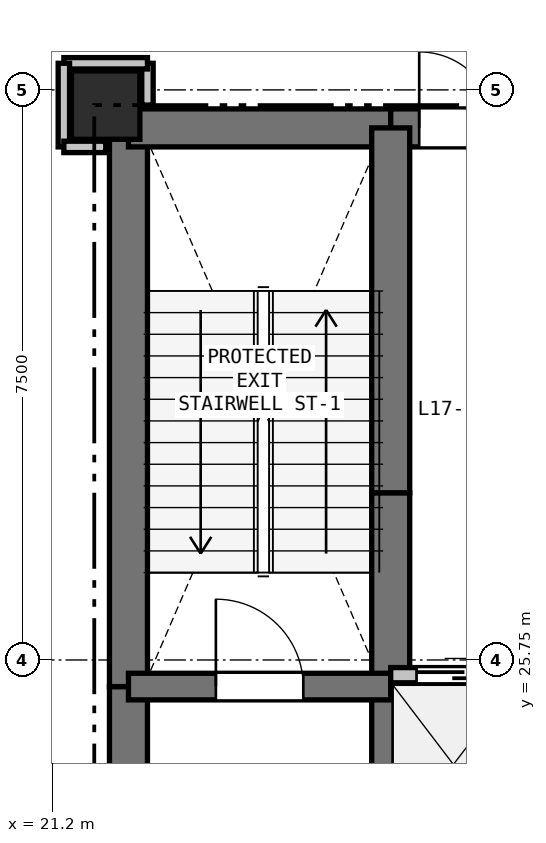
"""IFC4 building model, lengths in metres.
Left out: names, types, materials, properties, quantities, classifications, styles, units other than length and angle.
Written with IfcOpenShell. Run it as: python <this file> out.ifc"""

import sys

from ifc_helpers import new_model, si_unit, direction, frame, frame_2d, origin, origin_2d, place, context, subcontext, project, spatial, rectangle, extrude, element, fill, save


model = new_model("IFC4")
c1 = context("Model", 3, precision=1e-05, world=origin(), true_north=direction((0.0, 1.0)))
c2 = subcontext(c1, "Body", "Model", "MODEL_VIEW")
j1 = project(units=[si_unit("LENGTHUNIT", "METRE"), si_unit("PLANEANGLEUNIT", "RADIAN")], contexts=[c1])
p1 = place(None, origin())
s1 = spatial("IfcSite", under=j1, at=p1, CompositionType="ELEMENT")
p2 = place(p1, origin())
s2 = spatial("IfcBuilding", under=s1, at=p2, CompositionType="ELEMENT")
p3 = place(p2, frame((0.0, 0.0, 62.1)))
s3 = spatial("IfcBuildingStorey", under=s2, at=p3, CompositionType="ELEMENT", Elevation=62.1)
p4 = place(p3, frame((21.9, 33.05, 0.0), z_axis=(0.0, 0.0, 1.0), x_axis=(1.0, 0.0, 0.0)))
e1 = element("IfcColumn", 1, at=p4, inside=s3, PredefinedType="COLUMN", context=c2, shape_type="SweptSolid", body=[
    extrude(rectangle(XDim=0.9, YDim=0.9, at=origin_2d()), origin(), (0.0, 0.0, 1.0), 4.8),
])
p5 = place(p3, frame((22.2, 20.75, 0.0), z_axis=(0.0, 0.0, 1.0), x_axis=(0.0, 1.0, 0.0)))
e2 = element("IfcWall", 2, at=p5, inside=s3, PredefinedType="SHEAR", context=c2, shape_type="SweptSolid", body=[
    extrude(rectangle(XDim=4.65, YDim=0.5, at=frame_2d((2.325, 0.0))), origin(), (0.0, 0.0, 1.0), 4.48),
])
p6 = place(p3, frame((22.2, 25.4, 0.0), z_axis=(0.0, 0.0, 1.0), x_axis=(0.0, 1.0, 0.0)))
e3 = element("IfcWall", 3, at=p6, inside=s3, PredefinedType="SHEAR", context=c2, shape_type="SweptSolid", body=[
    extrude(rectangle(XDim=7.35, YDim=0.5, at=frame_2d((3.675, 0.0))), origin(), (0.0, 0.0, 1.0), 4.48),
])
p7 = place(p3, frame((22.2, 32.75, 0.0), z_axis=(0.0, 0.0, 1.0), x_axis=(1.0, 0.0, 0.0)))
e4 = element("IfcWall", 4, at=p7, inside=s3, PredefinedType="SHEAR", context=c2, shape_type="SweptSolid", body=[
    extrude(rectangle(XDim=3.45, YDim=0.5, at=frame_2d((1.725, 0.0))), origin(), (0.0, 0.0, 1.0), 4.48),
])
p8 = place(p3, frame((25.65, 32.75, 0.0), z_axis=(0.0, 0.0, 1.0), x_axis=(1.0, 0.0, 0.0)))
e5 = element("IfcWall", 5, at=p8, inside=s3, PredefinedType="SHEAR", context=c2, shape_type="SweptSolid", body=[
    extrude(rectangle(XDim=1.75, YDim=0.5, at=frame_2d((0.875, 0.0))), origin(), (0.0, 0.0, 1.0), 4.48),
])
p9 = place(p8, frame((0.375, 0.0, 0.0)))
e6 = element("IfcOpeningElement", 6, at=p9, cuts=e5, PredefinedType="OPENING", context=c2, shape_type="SweptSolid", body=[
    extrude(rectangle(XDim=1.0, YDim=2.15, at=frame_2d((0.5, 1.075))), frame((0.0, 0.26, 0.0), z_axis=(0.0, -1.0, 0.0), x_axis=(1.0, 0.0, 0.0)), (0.0, 0.0, 1.0), 0.52),
])
p10 = place(p3, frame((25.65, 22.75, 0.0), z_axis=(0.0, 0.0, 1.0), x_axis=(0.0, 1.0, 0.0)))
e7 = element("IfcWall", 7, at=p10, inside=s3, PredefinedType="SHEAR", context=c2, shape_type="SweptSolid", body=[
    extrude(rectangle(XDim=2.8, YDim=0.5, at=frame_2d((1.4, 0.0))), origin(), (0.0, 0.0, 1.0), 4.48),
])
p11 = place(p3, frame((25.65, 25.55, 0.0), z_axis=(0.0, 0.0, 1.0), x_axis=(0.0, 1.0, 0.0)))
e8 = element("IfcWall", 8, at=p11, inside=s3, PredefinedType="SHEAR", context=c2, shape_type="SweptSolid", body=[
    extrude(rectangle(XDim=2.4, YDim=0.5, at=frame_2d((1.2, 0.0))), origin(), (0.0, 0.0, 1.0), 4.48),
])
p12 = place(p3, frame((25.65, 27.95, 0.0), z_axis=(0.0, 0.0, 1.0), x_axis=(0.0, 1.0, 0.0)))
e9 = element("IfcWall", 9, at=p12, inside=s3, PredefinedType="SHEAR", context=c2, shape_type="SweptSolid", body=[
    extrude(rectangle(XDim=4.8, YDim=0.5, at=frame_2d((2.4, 0.0))), origin(), (0.0, 0.0, 1.0), 4.48),
])
p13 = place(p3, frame((22.2, 25.4, 0.0), z_axis=(0.0, 0.0, 1.0), x_axis=(1.0, 0.0, 0.0)))
e10 = element("IfcWall", 10, at=p13, inside=s3, PredefinedType="SHEAR", context=c2, shape_type="SweptSolid", body=[
    extrude(rectangle(XDim=3.45, YDim=0.35, at=frame_2d((1.725, 0.0))), origin(), (0.0, 0.0, 1.0), 4.48),
])
p14 = place(p13, frame((1.15, 0.0, 0.0)))
e11 = element("IfcOpeningElement", 11, at=p14, cuts=e10, PredefinedType="OPENING", context=c2, shape_type="SweptSolid", body=[
    extrude(rectangle(XDim=1.15, YDim=2.15, at=frame_2d((0.575, 1.075))), frame((0.0, 0.185, 0.0), z_axis=(0.0, -1.0, 0.0), x_axis=(1.0, 0.0, 0.0)), (0.0, 0.0, 1.0), 0.37),
])
p15 = place(p3, frame((25.65, 25.55, 0.0), z_axis=(0.0, 0.0, 1.0), x_axis=(1.0, 0.0, 0.0)))
e12 = element("IfcWall", 12, at=p15, inside=s3, PredefinedType="PARTITIONING", context=c2, shape_type="SweptSolid", body=[
    extrude(rectangle(XDim=4.95, YDim=0.2, at=frame_2d((2.475, 0.0))), origin(), (0.0, 0.0, 1.0), 4.48),
])
p16 = place(p15, frame((0.34, 0.0, 0.0)))
e13 = element("IfcOpeningElement", 13, at=p16, cuts=e12, PredefinedType="OPENING", context=c2, shape_type="SweptSolid", body=[
    extrude(rectangle(XDim=1.1, YDim=2.15, at=frame_2d((0.55, 1.075))), frame((0.0, 0.11, 0.0), z_axis=(0.0, -1.0, 0.0), x_axis=(1.0, 0.0, 0.0)), (0.0, 0.0, 1.0), 0.22),
])
p17 = place(p15, frame((1.99, 0.0, 0.0)))
e14 = element("IfcOpeningElement", 14, at=p17, cuts=e12, PredefinedType="OPENING", context=c2, shape_type="SweptSolid", body=[
    extrude(rectangle(XDim=1.1, YDim=2.15, at=frame_2d((0.55, 1.075))), frame((0.0, 0.11, 0.0), z_axis=(0.0, -1.0, 0.0), x_axis=(1.0, 0.0, 0.0)), (0.0, 0.0, 1.0), 0.22),
])
p18 = place(p15, frame((3.64, 0.0, 0.0)))
e15 = element("IfcOpeningElement", 15, at=p18, cuts=e12, PredefinedType="OPENING", context=c2, shape_type="SweptSolid", body=[
    extrude(rectangle(XDim=1.1, YDim=2.15, at=frame_2d((0.55, 1.075))), frame((0.0, 0.11, 0.0), z_axis=(0.0, -1.0, 0.0), x_axis=(1.0, 0.0, 0.0)), (0.0, 0.0, 1.0), 0.22),
])
p19 = place(p3, frame((22.45, 33.05, 0.0), z_axis=(0.0, 0.0, 1.0), x_axis=(0.0, 1.0, 0.0)))
e16 = element("IfcWall", 16, at=p19, inside=s3, PredefinedType="PARTITIONING", context=c2, shape_type="SweptSolid", body=[
    extrude(rectangle(XDim=0.55, YDim=0.15, at=frame_2d((0.275, 0.0))), origin(), (0.0, 0.0, 1.0), 3.928),
])
p20 = place(p3, frame((22.45, 33.6, 0.0), z_axis=(0.0, 0.0, 1.0), x_axis=(-1.0, 0.0, 0.0)))
e17 = element("IfcWall", 17, at=p20, inside=s3, PredefinedType="PARTITIONING", context=c2, shape_type="SweptSolid", body=[
    extrude(rectangle(XDim=1.1, YDim=0.15, at=frame_2d((0.55, 0.0))), origin(), (0.0, 0.0, 1.0), 4.48),
])
p21 = place(p3, frame((21.35, 33.6, 0.0), z_axis=(0.0, 0.0, 1.0), x_axis=(0.0, -1.0, 0.0)))
e18 = element("IfcWall", 18, at=p21, inside=s3, PredefinedType="PARTITIONING", context=c2, shape_type="SweptSolid", body=[
    extrude(rectangle(XDim=1.1, YDim=0.15, at=frame_2d((0.55, 0.0))), origin(), (0.0, 0.0, 1.0), 4.48),
])
p22 = place(p3, frame((21.35, 32.5, 0.0), z_axis=(0.0, 0.0, 1.0), x_axis=(1.0, 0.0, 0.0)))
e19 = element("IfcWall", 19, at=p22, inside=s3, PredefinedType="PARTITIONING", context=c2, shape_type="SweptSolid", body=[
    extrude(rectangle(XDim=0.55, YDim=0.15, at=frame_2d((0.275, 0.0))), origin(), (0.0, 0.0, 1.0), 3.928),
])
p23 = place(p16, origin())
e20 = element("IfcDoor", 20, at=p23, inside=s3, OperationType="SLIDING_TO_LEFT", PredefinedType="DOOR", context=c2, shape_type="SweptSolid", body=[
    extrude(rectangle(XDim=1.1, YDim=2.15, at=frame_2d((0.55, 1.075))), frame((0.0, 0.025, 0.0), z_axis=(0.0, -1.0, 0.0), x_axis=(1.0, 0.0, 0.0)), (0.0, 0.0, 1.0), 0.05),
])
fill(e13, e20)
p24 = place(p9, origin())
e21 = element("IfcDoor", 21, at=p24, inside=s3, OperationType="SINGLE_SWING_LEFT", PredefinedType="DOOR", context=c2, shape_type="SweptSolid", body=[
    extrude(rectangle(XDim=1.0, YDim=2.15, at=frame_2d((0.5, 1.075))), frame((0.0, 0.025, 0.0), z_axis=(0.0, -1.0, 0.0), x_axis=(1.0, 0.0, 0.0)), (0.0, 0.0, 1.0), 0.05),
])
fill(e6, e21)
p25 = place(p14, origin())
e22 = element("IfcDoor", 22, at=p25, inside=s3, OperationType="SINGLE_SWING_LEFT", PredefinedType="DOOR", context=c2, shape_type="SweptSolid", body=[
    extrude(rectangle(XDim=1.15, YDim=2.15, at=frame_2d((0.575, 1.075))), frame((0.0, 0.025, 0.0), z_axis=(0.0, -1.0, 0.0), x_axis=(1.0, 0.0, 0.0)), (0.0, 0.0, 1.0), 0.05),
])
fill(e11, e22)
save(model, sys.argv[1])
